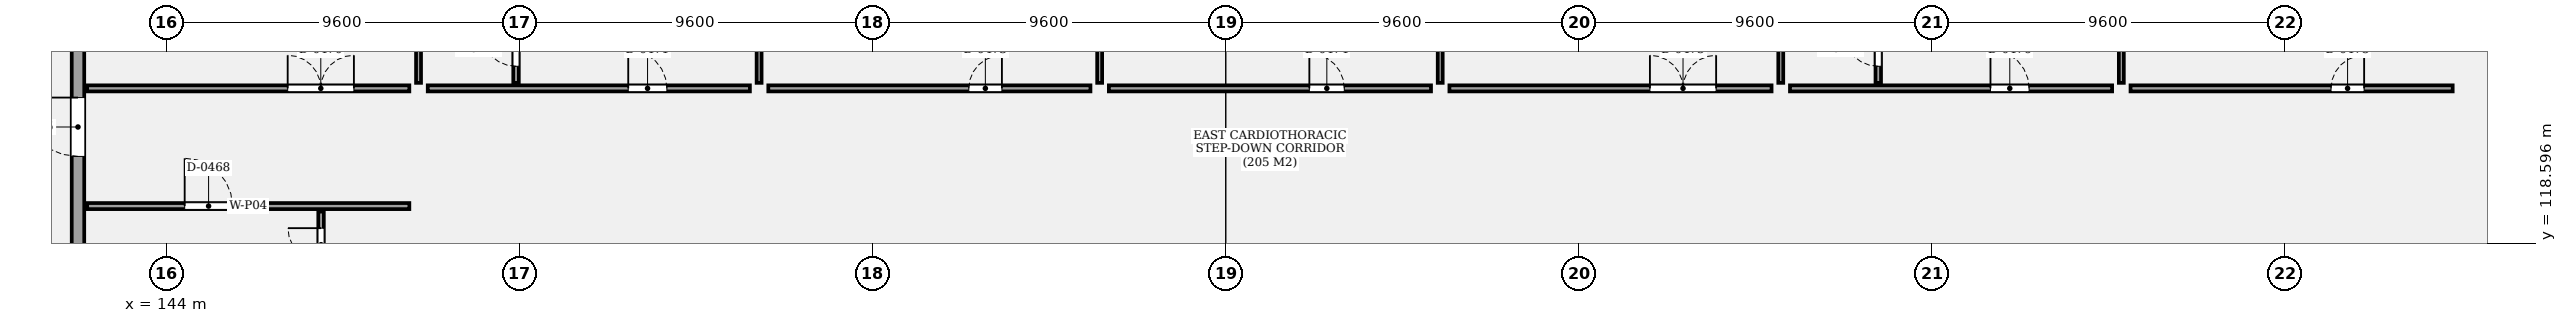
"""IFC4 building model, lengths in metres.
Left out: names, types, materials, properties, quantities, classifications, styles, units other than length and angle.
Written with IfcOpenShell. Run it as: python <this file> out.ifc"""

import sys

from ifc_helpers import new_model, si_unit, direction, frame, frame_2d, origin, place, context, subcontext, project, spatial, rectangle, extrude, element, fill, save


model = new_model("IFC4")
c1 = context("Model", 3, precision=1e-05, world=origin(), true_north=direction((0.0, 1.0)))
c2 = subcontext(c1, "Body", "Model", "MODEL_VIEW")
j1 = project(units=[si_unit("LENGTHUNIT", "METRE"), si_unit("PLANEANGLEUNIT", "RADIAN")], contexts=[c1])
p1 = place(None, origin())
s1 = spatial("IfcSite", under=j1, at=p1, CompositionType="ELEMENT")
p2 = place(p1, origin())
s2 = spatial("IfcBuilding", under=s1, at=p2, CompositionType="ELEMENT")
p3 = place(p2, frame((0.0, 0.0, 22.0)))
s3 = spatial("IfcBuildingStorey", under=s2, at=p3, CompositionType="ELEMENT", Elevation=22.0)
p4 = place(p3, frame((141.6, 100.96, 0.0), z_axis=(0.0, 0.0, 1.0), x_axis=(0.0, 1.0, 0.0)))
e1 = element("IfcWall", 1, at=p4, inside=s3, PredefinedType="SOLIDWALL", context=c2, shape_type="SweptSolid", body=[
    extrude(rectangle(XDim=33.28, YDim=0.34, at=frame_2d((16.64, 0.0))), origin(), (0.0, 0.0, 1.0), 3.39),
])
p5 = place(p4, frame((19.99, 0.0, 0.0)))
e2 = element("IfcOpeningElement", 2, at=p5, cuts=e1, PredefinedType="OPENING", context=c2, shape_type="SweptSolid", body=[
    extrude(rectangle(XDim=1.6, YDim=2.3, at=frame_2d((0.8, 1.15))), frame((0.0, 0.18, 0.0), z_axis=(0.0, -1.0, 0.0), x_axis=(1.0, 0.0, 0.0)), (0.0, 0.0, 1.0), 0.36),
])
p6 = place(p3, frame((141.85, 119.6, 0.0), z_axis=(0.0, 0.0, 1.0), x_axis=(1.0, 0.0, 0.0)))
e3 = element("IfcWall", 3, at=p6, inside=s3, PredefinedType="PARTITIONING", context=c2, shape_type="SweptSolid", body=[
    extrude(rectangle(XDim=8.757, YDim=0.165, at=frame_2d((4.378, 0.0))), origin(), (0.0, 0.0, 1.0), 3.3),
])
p7 = place(p6, frame((2.65, 0.0, 0.0)))
e4 = element("IfcOpeningElement", 4, at=p7, cuts=e3, PredefinedType="OPENING", context=c2, shape_type="SweptSolid", body=[
    extrude(rectangle(XDim=1.3, YDim=2.2, at=frame_2d((0.65, 1.1))), frame((0.0, 0.093, 0.0), z_axis=(0.0, -1.0, 0.0), x_axis=(1.0, 0.0, 0.0)), (0.0, 0.0, 1.0), 0.185),
])
p8 = place(p3, frame((148.207, 117.15, 0.0), z_axis=(0.0, 0.0, 1.0), x_axis=(0.0, 1.0, 0.0)))
e5 = element("IfcWall", 5, at=p8, inside=s3, PredefinedType="PARTITIONING", context=c2, shape_type="SweptSolid", body=[
    extrude(rectangle(XDim=2.3, YDim=0.15, at=frame_2d((1.15, 0.0))), origin(), (0.0, 0.0, 1.0), 3.3),
])
p9 = place(p8, frame((0.95, 0.0, 0.0)))
e6 = element("IfcOpeningElement", 6, at=p9, cuts=e5, PredefinedType="OPENING", context=c2, shape_type="SweptSolid", body=[
    extrude(rectangle(XDim=0.9, YDim=2.1, at=frame_2d((0.45, 1.05))), frame((0.0, 0.085, 0.0), z_axis=(0.0, -1.0, 0.0), x_axis=(1.0, 0.0, 0.0)), (0.0, 0.0, 1.0), 0.17),
])
p10 = place(p3, frame((141.85, 122.8, 0.0), z_axis=(0.0, 0.0, 1.0), x_axis=(1.0, 0.0, 0.0)))
e7 = element("IfcWall", 7, at=p10, inside=s3, PredefinedType="PARTITIONING", context=c2, shape_type="SweptSolid", body=[
    extrude(rectangle(XDim=8.757, YDim=0.165, at=frame_2d((4.378, 0.0))), origin(), (0.0, 0.0, 1.0), 3.3),
])
p11 = place(p10, frame((5.45, 0.0, 0.0)))
e8 = element("IfcOpeningElement", 8, at=p11, cuts=e7, PredefinedType="OPENING", context=c2, shape_type="SweptSolid", body=[
    extrude(rectangle(XDim=1.8, YDim=2.2, at=frame_2d((0.9, 1.1))), frame((0.0, 0.093, 0.0), z_axis=(0.0, -1.0, 0.0), x_axis=(1.0, 0.0, 0.0)), (0.0, 0.0, 1.0), 0.185),
])
p12 = place(p3, frame((151.107, 122.8, 0.0), z_axis=(0.0, 0.0, 1.0), x_axis=(1.0, 0.0, 0.0)))
e9 = element("IfcWall", 9, at=p12, inside=s3, PredefinedType="PARTITIONING", context=c2, shape_type="SweptSolid", body=[
    extrude(rectangle(XDim=8.757, YDim=0.165, at=frame_2d((4.378, 0.0))), origin(), (0.0, 0.0, 1.0), 3.3),
])
p13 = place(p12, frame((5.45, 0.0, 0.0)))
e10 = element("IfcOpeningElement", 10, at=p13, cuts=e9, PredefinedType="OPENING", context=c2, shape_type="SweptSolid", body=[
    extrude(rectangle(XDim=1.05, YDim=2.2, at=frame_2d((0.525, 1.1))), frame((0.0, 0.093, 0.0), z_axis=(0.0, -1.0, 0.0), x_axis=(1.0, 0.0, 0.0)), (0.0, 0.0, 1.0), 0.185),
])
p14 = place(p3, frame((153.507, 122.95, 0.0), z_axis=(0.0, 0.0, 1.0), x_axis=(0.0, 1.0, 0.0)))
e11 = element("IfcWall", 11, at=p14, inside=s3, PredefinedType="PARTITIONING", context=c2, shape_type="SweptSolid", body=[
    extrude(rectangle(XDim=2.3, YDim=0.15, at=frame_2d((1.15, 0.0))), origin(), (0.0, 0.0, 1.0), 3.3),
])
p15 = place(p14, frame((0.45, 0.0, 0.0)))
e12 = element("IfcOpeningElement", 12, at=p15, cuts=e11, PredefinedType="OPENING", context=c2, shape_type="SweptSolid", body=[
    extrude(rectangle(XDim=0.95, YDim=2.1, at=frame_2d((0.475, 1.05))), frame((0.0, 0.085, 0.0), z_axis=(0.0, -1.0, 0.0), x_axis=(1.0, 0.0, 0.0)), (0.0, 0.0, 1.0), 0.17),
])
p16 = place(p3, frame((150.857, 122.95, 0.0), z_axis=(0.0, 0.0, 1.0), x_axis=(0.0, 1.0, 0.0)))
e13 = element("IfcWall", 13, at=p16, inside=s3, PredefinedType="PARTITIONING", context=c2, shape_type="SweptSolid", body=[
    extrude(rectangle(XDim=10.9, YDim=0.135, at=frame_2d((5.45, 0.0))), origin(), (0.0, 0.0, 1.0), 3.3),
])
p17 = place(p3, frame((160.364, 122.8, 0.0), z_axis=(0.0, 0.0, 1.0), x_axis=(1.0, 0.0, 0.0)))
e14 = element("IfcWall", 14, at=p17, inside=s3, PredefinedType="PARTITIONING", context=c2, shape_type="SweptSolid", body=[
    extrude(rectangle(XDim=8.757, YDim=0.165, at=frame_2d((4.378, 0.0))), origin(), (0.0, 0.0, 1.0), 3.3),
])
p18 = place(p17, frame((5.45, 0.0, 0.0)))
e15 = element("IfcOpeningElement", 15, at=p18, cuts=e14, PredefinedType="OPENING", context=c2, shape_type="SweptSolid", body=[
    extrude(rectangle(XDim=0.9, YDim=2.1, at=frame_2d((0.45, 1.05))), frame((0.0, 0.093, 0.0), z_axis=(0.0, -1.0, 0.0), x_axis=(1.0, 0.0, 0.0)), (0.0, 0.0, 1.0), 0.185),
])
p19 = place(p3, frame((160.114, 122.95, 0.0), z_axis=(0.0, 0.0, 1.0), x_axis=(0.0, 1.0, 0.0)))
e16 = element("IfcWall", 16, at=p19, inside=s3, PredefinedType="PARTITIONING", context=c2, shape_type="SweptSolid", body=[
    extrude(rectangle(XDim=10.9, YDim=0.135, at=frame_2d((5.45, 0.0))), origin(), (0.0, 0.0, 1.0), 3.3),
])
p20 = place(p3, frame((169.621, 122.8, 0.0), z_axis=(0.0, 0.0, 1.0), x_axis=(1.0, 0.0, 0.0)))
e17 = element("IfcWall", 17, at=p20, inside=s3, PredefinedType="PARTITIONING", context=c2, shape_type="SweptSolid", body=[
    extrude(rectangle(XDim=8.757, YDim=0.165, at=frame_2d((4.378, 0.0))), origin(), (0.0, 0.0, 1.0), 3.3),
])
p21 = place(p20, frame((5.45, 0.0, 0.0)))
e18 = element("IfcOpeningElement", 18, at=p21, cuts=e17, PredefinedType="OPENING", context=c2, shape_type="SweptSolid", body=[
    extrude(rectangle(XDim=0.95, YDim=2.1, at=frame_2d((0.475, 1.05))), frame((0.0, 0.093, 0.0), z_axis=(0.0, -1.0, 0.0), x_axis=(1.0, 0.0, 0.0)), (0.0, 0.0, 1.0), 0.185),
])
p22 = place(p3, frame((169.371, 122.95, 0.0), z_axis=(0.0, 0.0, 1.0), x_axis=(0.0, 1.0, 0.0)))
e19 = element("IfcWall", 19, at=p22, inside=s3, PredefinedType="PARTITIONING", context=c2, shape_type="SweptSolid", body=[
    extrude(rectangle(XDim=10.9, YDim=0.135, at=frame_2d((5.45, 0.0))), origin(), (0.0, 0.0, 1.0), 3.3),
])
p23 = place(p3, frame((178.878, 122.8, 0.0), z_axis=(0.0, 0.0, 1.0), x_axis=(1.0, 0.0, 0.0)))
e20 = element("IfcWall", 20, at=p23, inside=s3, PredefinedType="PARTITIONING", context=c2, shape_type="SweptSolid", body=[
    extrude(rectangle(XDim=8.757, YDim=0.165, at=frame_2d((4.378, 0.0))), origin(), (0.0, 0.0, 1.0), 3.3),
])
p24 = place(p23, frame((5.45, 0.0, 0.0)))
e21 = element("IfcOpeningElement", 21, at=p24, cuts=e20, PredefinedType="OPENING", context=c2, shape_type="SweptSolid", body=[
    extrude(rectangle(XDim=1.8, YDim=2.2, at=frame_2d((0.9, 1.1))), frame((0.0, 0.093, 0.0), z_axis=(0.0, -1.0, 0.0), x_axis=(1.0, 0.0, 0.0)), (0.0, 0.0, 1.0), 0.185),
])
p25 = place(p3, frame((178.628, 122.95, 0.0), z_axis=(0.0, 0.0, 1.0), x_axis=(0.0, 1.0, 0.0)))
e22 = element("IfcWall", 22, at=p25, inside=s3, PredefinedType="PARTITIONING", context=c2, shape_type="SweptSolid", body=[
    extrude(rectangle(XDim=10.9, YDim=0.135, at=frame_2d((5.45, 0.0))), origin(), (0.0, 0.0, 1.0), 3.3),
])
p26 = place(p3, frame((188.135, 122.8, 0.0), z_axis=(0.0, 0.0, 1.0), x_axis=(1.0, 0.0, 0.0)))
e23 = element("IfcWall", 23, at=p26, inside=s3, PredefinedType="PARTITIONING", context=c2, shape_type="SweptSolid", body=[
    extrude(rectangle(XDim=8.757, YDim=0.165, at=frame_2d((4.378, 0.0))), origin(), (0.0, 0.0, 1.0), 3.3),
])
p27 = place(p26, frame((5.45, 0.0, 0.0)))
e24 = element("IfcOpeningElement", 24, at=p27, cuts=e23, PredefinedType="OPENING", context=c2, shape_type="SweptSolid", body=[
    extrude(rectangle(XDim=1.05, YDim=2.2, at=frame_2d((0.525, 1.1))), frame((0.0, 0.093, 0.0), z_axis=(0.0, -1.0, 0.0), x_axis=(1.0, 0.0, 0.0)), (0.0, 0.0, 1.0), 0.185),
])
p28 = place(p3, frame((190.535, 122.95, 0.0), z_axis=(0.0, 0.0, 1.0), x_axis=(0.0, 1.0, 0.0)))
e25 = element("IfcWall", 25, at=p28, inside=s3, PredefinedType="PARTITIONING", context=c2, shape_type="SweptSolid", body=[
    extrude(rectangle(XDim=2.3, YDim=0.15, at=frame_2d((1.15, 0.0))), origin(), (0.0, 0.0, 1.0), 3.3),
])
p29 = place(p28, frame((0.45, 0.0, 0.0)))
e26 = element("IfcOpeningElement", 26, at=p29, cuts=e25, PredefinedType="OPENING", context=c2, shape_type="SweptSolid", body=[
    extrude(rectangle(XDim=0.95, YDim=2.1, at=frame_2d((0.475, 1.05))), frame((0.0, 0.085, 0.0), z_axis=(0.0, -1.0, 0.0), x_axis=(1.0, 0.0, 0.0)), (0.0, 0.0, 1.0), 0.17),
])
p30 = place(p3, frame((187.885, 122.95, 0.0), z_axis=(0.0, 0.0, 1.0), x_axis=(0.0, 1.0, 0.0)))
e27 = element("IfcWall", 27, at=p30, inside=s3, PredefinedType="PARTITIONING", context=c2, shape_type="SweptSolid", body=[
    extrude(rectangle(XDim=10.9, YDim=0.135, at=frame_2d((5.45, 0.0))), origin(), (0.0, 0.0, 1.0), 3.3),
])
p31 = place(p3, frame((197.392, 122.8, 0.0), z_axis=(0.0, 0.0, 1.0), x_axis=(1.0, 0.0, 0.0)))
e28 = element("IfcWall", 28, at=p31, inside=s3, PredefinedType="PARTITIONING", context=c2, shape_type="SweptSolid", body=[
    extrude(rectangle(XDim=8.757, YDim=0.165, at=frame_2d((4.378, 0.0))), origin(), (0.0, 0.0, 1.0), 3.3),
])
p32 = place(p31, frame((5.45, 0.0, 0.0)))
e29 = element("IfcOpeningElement", 29, at=p32, cuts=e28, PredefinedType="OPENING", context=c2, shape_type="SweptSolid", body=[
    extrude(rectangle(XDim=0.9, YDim=2.1, at=frame_2d((0.45, 1.05))), frame((0.0, 0.093, 0.0), z_axis=(0.0, -1.0, 0.0), x_axis=(1.0, 0.0, 0.0)), (0.0, 0.0, 1.0), 0.185),
])
p33 = place(p3, frame((197.142, 122.95, 0.0), z_axis=(0.0, 0.0, 1.0), x_axis=(0.0, 1.0, 0.0)))
e30 = element("IfcWall", 30, at=p33, inside=s3, PredefinedType="PARTITIONING", context=c2, shape_type="SweptSolid", body=[
    extrude(rectangle(XDim=10.9, YDim=0.135, at=frame_2d((5.45, 0.0))), origin(), (0.0, 0.0, 1.0), 3.3),
])
p34 = place(p5, origin())
e31 = element("IfcDoor", 31, at=p34, inside=s3, OperationType="SINGLE_SWING_RIGHT", PredefinedType="DOOR", context=c2, shape_type="SweptSolid", body=[
    extrude(rectangle(XDim=1.6, YDim=2.3, at=frame_2d((0.8, 1.15))), frame((0.0, 0.025, 0.0), z_axis=(0.0, -1.0, 0.0), x_axis=(1.0, 0.0, 0.0)), (0.0, 0.0, 1.0), 0.05),
])
fill(e2, e31)
p35 = place(p7, origin())
e32 = element("IfcDoor", 32, at=p35, inside=s3, OperationType="SINGLE_SWING_LEFT", PredefinedType="DOOR", context=c2, shape_type="SweptSolid", body=[
    extrude(rectangle(XDim=1.3, YDim=2.2, at=frame_2d((0.65, 1.1))), frame((0.0, 0.025, 0.0), z_axis=(0.0, -1.0, 0.0), x_axis=(1.0, 0.0, 0.0)), (0.0, 0.0, 1.0), 0.05),
])
fill(e4, e32)
p36 = place(p9, origin())
e33 = element("IfcDoor", 33, at=p36, inside=s3, OperationType="SINGLE_SWING_RIGHT", PredefinedType="DOOR", context=c2, shape_type="SweptSolid", body=[
    extrude(rectangle(XDim=0.9, YDim=2.1, at=frame_2d((0.45, 1.05))), frame((0.0, 0.025, 0.0), z_axis=(0.0, -1.0, 0.0), x_axis=(1.0, 0.0, 0.0)), (0.0, 0.0, 1.0), 0.05),
])
fill(e6, e33)
p37 = place(p11, origin())
e34 = element("IfcDoor", 34, at=p37, inside=s3, OperationType="DOUBLE_DOOR_SINGLE_SWING", PredefinedType="DOOR", context=c2, shape_type="SweptSolid", body=[
    extrude(rectangle(XDim=1.8, YDim=2.2, at=frame_2d((0.9, 1.1))), frame((0.0, 0.025, 0.0), z_axis=(0.0, -1.0, 0.0), x_axis=(1.0, 0.0, 0.0)), (0.0, 0.0, 1.0), 0.05),
])
fill(e8, e34)
p38 = place(p13, origin())
e35 = element("IfcDoor", 35, at=p38, inside=s3, OperationType="SINGLE_SWING_LEFT", PredefinedType="DOOR", context=c2, shape_type="SweptSolid", body=[
    extrude(rectangle(XDim=1.05, YDim=2.2, at=frame_2d((0.525, 1.1))), frame((0.0, 0.025, 0.0), z_axis=(0.0, -1.0, 0.0), x_axis=(1.0, 0.0, 0.0)), (0.0, 0.0, 1.0), 0.05),
])
fill(e10, e35)
p39 = place(p15, origin())
e36 = element("IfcDoor", 36, at=p39, inside=s3, OperationType="SINGLE_SWING_RIGHT", PredefinedType="DOOR", context=c2, shape_type="SweptSolid", body=[
    extrude(rectangle(XDim=0.95, YDim=2.1, at=frame_2d((0.475, 1.05))), frame((0.0, 0.025, 0.0), z_axis=(0.0, -1.0, 0.0), x_axis=(1.0, 0.0, 0.0)), (0.0, 0.0, 1.0), 0.05),
])
fill(e12, e36)
p40 = place(p18, origin())
e37 = element("IfcDoor", 37, at=p40, inside=s3, OperationType="SINGLE_SWING_RIGHT", PredefinedType="DOOR", context=c2, shape_type="SweptSolid", body=[
    extrude(rectangle(XDim=0.9, YDim=2.1, at=frame_2d((0.45, 1.05))), frame((0.0, 0.025, 0.0), z_axis=(0.0, -1.0, 0.0), x_axis=(1.0, 0.0, 0.0)), (0.0, 0.0, 1.0), 0.05),
])
fill(e15, e37)
p41 = place(p21, origin())
e38 = element("IfcDoor", 38, at=p41, inside=s3, OperationType="SINGLE_SWING_LEFT", PredefinedType="DOOR", context=c2, shape_type="SweptSolid", body=[
    extrude(rectangle(XDim=0.95, YDim=2.1, at=frame_2d((0.475, 1.05))), frame((0.0, 0.025, 0.0), z_axis=(0.0, -1.0, 0.0), x_axis=(1.0, 0.0, 0.0)), (0.0, 0.0, 1.0), 0.05),
])
fill(e18, e38)
p42 = place(p24, origin())
e39 = element("IfcDoor", 39, at=p42, inside=s3, OperationType="DOUBLE_DOOR_SINGLE_SWING", PredefinedType="DOOR", context=c2, shape_type="SweptSolid", body=[
    extrude(rectangle(XDim=1.8, YDim=2.2, at=frame_2d((0.9, 1.1))), frame((0.0, 0.025, 0.0), z_axis=(0.0, -1.0, 0.0), x_axis=(1.0, 0.0, 0.0)), (0.0, 0.0, 1.0), 0.05),
])
fill(e21, e39)
p43 = place(p27, origin())
e40 = element("IfcDoor", 40, at=p43, inside=s3, OperationType="SINGLE_SWING_LEFT", PredefinedType="DOOR", context=c2, shape_type="SweptSolid", body=[
    extrude(rectangle(XDim=1.05, YDim=2.2, at=frame_2d((0.525, 1.1))), frame((0.0, 0.025, 0.0), z_axis=(0.0, -1.0, 0.0), x_axis=(1.0, 0.0, 0.0)), (0.0, 0.0, 1.0), 0.05),
])
fill(e24, e40)
p44 = place(p29, origin())
e41 = element("IfcDoor", 41, at=p44, inside=s3, OperationType="SINGLE_SWING_RIGHT", PredefinedType="DOOR", context=c2, shape_type="SweptSolid", body=[
    extrude(rectangle(XDim=0.95, YDim=2.1, at=frame_2d((0.475, 1.05))), frame((0.0, 0.025, 0.0), z_axis=(0.0, -1.0, 0.0), x_axis=(1.0, 0.0, 0.0)), (0.0, 0.0, 1.0), 0.05),
])
fill(e26, e41)
p45 = place(p32, origin())
e42 = element("IfcDoor", 42, at=p45, inside=s3, OperationType="SINGLE_SWING_RIGHT", PredefinedType="DOOR", context=c2, shape_type="SweptSolid", body=[
    extrude(rectangle(XDim=0.9, YDim=2.1, at=frame_2d((0.45, 1.05))), frame((0.0, 0.025, 0.0), z_axis=(0.0, -1.0, 0.0), x_axis=(1.0, 0.0, 0.0)), (0.0, 0.0, 1.0), 0.05),
])
fill(e29, e42)
save(model, sys.argv[1])
